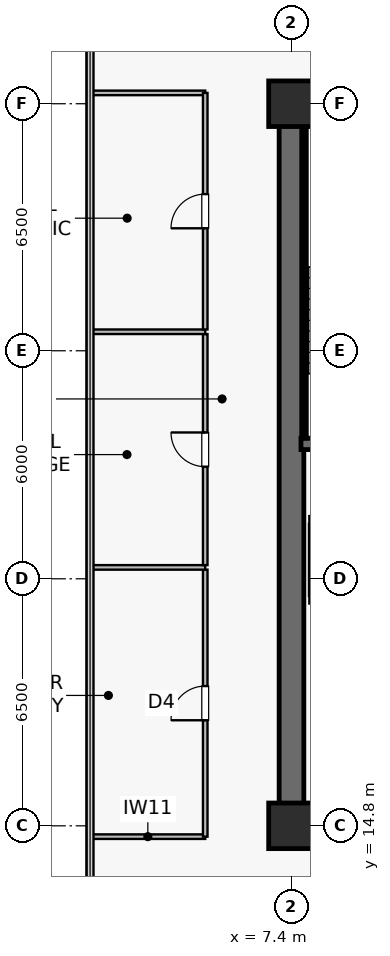
"""IFC4 building model, lengths in metres.
Left out: names, types, materials, properties, quantities, classifications, styles, units other than length and angle.
Written with IfcOpenShell. Run it as: python <this file> out.ifc"""

import sys

from ifc_helpers import new_model, si_unit, direction, frame, frame_2d, origin, origin_2d, place, context, subcontext, project, spatial, rectangle, extrude, source, transform, mapped, element, fill, save


model = new_model("IFC4")
c1 = context("Model", 3, precision=1e-05, world=origin(), true_north=direction((0.0, 1.0)))
c2 = subcontext(c1, "Body", "Model", "MODEL_VIEW")
j1 = project(units=[si_unit("LENGTHUNIT", "METRE"), si_unit("PLANEANGLEUNIT", "RADIAN")], contexts=[c1])
p1 = place(None, origin())
s1 = spatial("IfcSite", under=j1, at=p1, CompositionType="ELEMENT")
p2 = place(p1, origin())
s2 = spatial("IfcBuilding", under=s1, at=p2, CompositionType="ELEMENT")
p3 = place(p2, frame((0.0, 0.0, 162.5)))
s3 = spatial("IfcBuildingStorey", under=s2, at=p3, CompositionType="ELEMENT", Elevation=162.5)
p4 = place(p3, frame((7.075, 14.8, 0.0), z_axis=(0.0, 0.0, 1.0), x_axis=(1.0, 0.0, 0.0)))
e1 = element("IfcWall", 1, at=p4, inside=s3, PredefinedType="SHEAR", context=c2, shape_type="SweptSolid", body=[
    extrude(rectangle(XDim=15.45, YDim=0.65, at=frame_2d((7.725, 0.0))), origin(), (0.0, 0.0, 1.0), 3.79),
])
p5 = place(p3, frame((7.075, 33.8, 0.0), z_axis=(0.0, 0.0, 1.0), x_axis=(1.0, 0.0, 0.0)))
e2 = element("IfcWall", 2, at=p5, inside=s3, PredefinedType="SHEAR", context=c2, shape_type="SweptSolid", body=[
    extrude(rectangle(XDim=15.45, YDim=0.65, at=frame_2d((7.725, 0.0))), origin(), (0.0, 0.0, 1.0), 3.79),
])
p6 = place(p5, frame((6.825, 0.0, 0.0)))
e3 = element("IfcOpeningElement", 3, at=p6, cuts=e2, PredefinedType="OPENING", context=c2, shape_type="SweptSolid", body=[
    extrude(rectangle(XDim=0.95, YDim=2.15, at=frame_2d((0.475, 1.075))), frame((0.0, 0.335, 0.0), z_axis=(0.0, -1.0, 0.0), x_axis=(1.0, 0.0, 0.0)), (0.0, 0.0, 1.0), 0.67),
])
p7 = place(p5, frame((11.89, 0.0, 0.0)))
e4 = element("IfcOpeningElement", 4, at=p7, cuts=e2, PredefinedType="OPENING", context=c2, shape_type="SweptSolid", body=[
    extrude(rectangle(XDim=0.95, YDim=2.15, at=frame_2d((0.475, 1.075))), frame((0.0, 0.335, 0.0), z_axis=(0.0, -1.0, 0.0), x_axis=(1.0, 0.0, 0.0)), (0.0, 0.0, 1.0), 0.67),
])
p8 = place(p3, frame((7.4, 15.125, 0.0), z_axis=(0.0, 0.0, 1.0), x_axis=(0.0, 1.0, 0.0)))
e5 = element("IfcWall", 5, at=p8, inside=s3, PredefinedType="SHEAR", context=c2, shape_type="SweptSolid", body=[
    extrude(rectangle(XDim=18.35, YDim=0.65, at=frame_2d((9.175, 0.0))), origin(), (0.0, 0.0, 1.0), 3.79),
])
p9 = place(p3, frame((7.65, 24.85, 0.0), z_axis=(0.0, 0.0, 1.0), x_axis=(1.0, 0.0, 0.0)))
e6 = element("IfcWall", 6, at=p9, inside=s3, PredefinedType="SHEAR", context=c2, shape_type="SweptSolid", body=[
    extrude(rectangle(XDim=3.8, YDim=0.3, at=frame_2d((1.9, 0.0))), origin(), (0.0, 0.0, 1.0), 3.79),
])
p10 = place(p3, frame((7.73, 33.4, 0.0), z_axis=(0.0, 0.0, 1.0), x_axis=(1.0, 0.0, 0.0)))
e7 = element("IfcWall", 7, at=p10, inside=s3, PredefinedType="SOLIDWALL", context=c2, shape_type="SweptSolid", body=[
    extrude(rectangle(XDim=3.72, YDim=0.12, at=frame_2d((1.86, 0.0))), origin(), (0.0, 0.0, 1.0), 3.79),
])
p11 = place(p3, frame((7.73, 25.0, 0.0), z_axis=(0.0, 0.0, 1.0), x_axis=(0.0, 1.0, 0.0)))
e8 = element("IfcWall", 8, at=p11, inside=s3, PredefinedType="SOLIDWALL", context=c2, shape_type="SweptSolid", body=[
    extrude(rectangle(XDim=8.32, YDim=0.12, at=frame_2d((4.16, 0.0))), origin(), (0.0, 0.0, 1.0), 3.79),
])
m1 = source(origin(), c2, "Body", "SweptSolid", [
    extrude(rectangle(XDim=1.2, YDim=1.2, at=origin_2d()), origin(), (0.0, 0.0, 1.0), 4.1),
])
for number, where, z_axis, x_axis in (
    (9, (7.4, 14.8, 0.0), (0.0, 0.0, 1.0), (1.0, 0.0, 0.0)),
    (10, (7.4, 33.8, 0.0), (0.0, 0.0, 1.0), (1.0, 0.0, 0.0)),
):
    element("IfcColumn", number, at=place(p3, frame(where, z_axis=z_axis, x_axis=x_axis)), inside=s3, PredefinedType="COLUMN", context=c2, shape_type="MappedRepresentation", body=[
        mapped(m1, transform((0.0, 0.0, 0.0), scale=1.0)),
    ])
for number, where, z_axis, x_axis in (
    (11, (7.87, 20.75, 0.0), (0.0, 0.0, 1.0), (1.0, 0.0, 0.0)),
    (12, (7.87, 22.85, 0.0), (0.0, 0.0, 1.0), (1.0, 0.0, 0.0)),
):
    element("IfcWall", number, at=place(p3, frame(where, z_axis=z_axis, x_axis=x_axis)), inside=s3, PredefinedType="SOLIDWALL", context=c2, shape_type="SweptSolid", body=[
        extrude(rectangle(XDim=2.26, YDim=0.2, at=frame_2d((1.13, 0.0))), origin(), (0.0, 0.0, 1.0), 3.79),
    ])
p12 = place(p3, frame((7.95, 20.85, 0.0), z_axis=(0.0, 0.0, 1.0), x_axis=(0.0, 1.0, 0.0)))
e13 = element("IfcWall", 13, at=p12, inside=s3, PredefinedType="SOLIDWALL", context=c2, shape_type="SweptSolid", body=[
    extrude(rectangle(XDim=1.9, YDim=0.18, at=frame_2d((0.95, 0.0))), origin(), (0.0, 0.0, 1.0), 3.79),
])
for number, where, z_axis, x_axis in (
    (14, (2.11, 14.515, 0.0), (0.0, 0.0, 1.0), (1.0, 0.0, 0.0)),
    (15, (2.11, 34.085, 0.0), (0.0, 0.0, 1.0), (1.0, 0.0, 0.0)),
):
    element("IfcWall", number, at=place(p3, frame(where, z_axis=z_axis, x_axis=x_axis)), inside=s3, PredefinedType="PARTITIONING", context=c2, shape_type="SweptSolid", body=[
        extrude(rectangle(XDim=3.02, YDim=0.12, at=frame_2d((1.51, 0.0))), origin(), (0.0, 0.0, 1.0), 3.79),
    ])
p13 = place(p3, frame((5.13, 14.515, 0.0), z_axis=(0.0, 0.0, 1.0), x_axis=(0.0, 1.0, 0.0)))
e16 = element("IfcWall", 16, at=p13, inside=s3, PredefinedType="PARTITIONING", context=c2, shape_type="SweptSolid", body=[
    extrude(rectangle(XDim=7.025, YDim=0.12, at=frame_2d((3.513, 0.0))), origin(), (0.0, 0.0, 1.0), 3.79),
])
p14 = place(p13, frame((3.062, 0.0, 0.0)))
e17 = element("IfcOpeningElement", 17, at=p14, cuts=e16, PredefinedType="OPENING", context=c2, shape_type="SweptSolid", body=[
    extrude(rectangle(XDim=0.9, YDim=2.1, at=frame_2d((0.45, 1.05))), frame((0.0, 0.07, 0.0), z_axis=(0.0, -1.0, 0.0), x_axis=(1.0, 0.0, 0.0)), (0.0, 0.0, 1.0), 0.14),
])
p15 = place(p3, frame((2.11, 21.6, 0.0), z_axis=(0.0, 0.0, 1.0), x_axis=(1.0, 0.0, 0.0)))
e18 = element("IfcWall", 18, at=p15, inside=s3, PredefinedType="PARTITIONING", context=c2, shape_type="SweptSolid", body=[
    extrude(rectangle(XDim=3.02, YDim=0.12, at=frame_2d((1.51, 0.0))), origin(), (0.0, 0.0, 1.0), 3.79),
])
p16 = place(p3, frame((5.13, 21.66, 0.0), z_axis=(0.0, 0.0, 1.0), x_axis=(0.0, 1.0, 0.0)))
e19 = element("IfcWall", 19, at=p16, inside=s3, PredefinedType="PARTITIONING", context=c2, shape_type="SweptSolid", body=[
    extrude(rectangle(XDim=6.08, YDim=0.12, at=frame_2d((3.04, 0.0))), origin(), (0.0, 0.0, 1.0), 3.79),
])
p17 = place(p16, frame((2.59, 0.0, 0.0)))
e20 = element("IfcOpeningElement", 20, at=p17, cuts=e19, PredefinedType="OPENING", context=c2, shape_type="SweptSolid", body=[
    extrude(rectangle(XDim=0.9, YDim=2.1, at=frame_2d((0.45, 1.05))), frame((0.0, 0.07, 0.0), z_axis=(0.0, -1.0, 0.0), x_axis=(1.0, 0.0, 0.0)), (0.0, 0.0, 1.0), 0.14),
])
p18 = place(p3, frame((2.11, 27.8, 0.0), z_axis=(0.0, 0.0, 1.0), x_axis=(1.0, 0.0, 0.0)))
e21 = element("IfcWall", 21, at=p18, inside=s3, PredefinedType="PARTITIONING", context=c2, shape_type="SweptSolid", body=[
    extrude(rectangle(XDim=3.02, YDim=0.12, at=frame_2d((1.51, 0.0))), origin(), (0.0, 0.0, 1.0), 3.79),
])
p19 = place(p3, frame((5.13, 27.86, 0.0), z_axis=(0.0, 0.0, 1.0), x_axis=(0.0, 1.0, 0.0)))
e22 = element("IfcWall", 22, at=p19, inside=s3, PredefinedType="PARTITIONING", context=c2, shape_type="SweptSolid", body=[
    extrude(rectangle(XDim=6.225, YDim=0.12, at=frame_2d((3.112, 0.0))), origin(), (0.0, 0.0, 1.0), 3.79),
])
p20 = place(p19, frame((2.663, 0.0, 0.0)))
e23 = element("IfcOpeningElement", 23, at=p20, cuts=e22, PredefinedType="OPENING", context=c2, shape_type="SweptSolid", body=[
    extrude(rectangle(XDim=0.9, YDim=2.1, at=frame_2d((0.45, 1.05))), frame((0.0, 0.07, 0.0), z_axis=(0.0, -1.0, 0.0), x_axis=(1.0, 0.0, 0.0)), (0.0, 0.0, 1.0), 0.14),
])
m2 = source(origin(), c2, "Body", "SweptSolid", [
    extrude(rectangle(XDim=0.9, YDim=2.1, at=frame_2d((0.45, 1.05))), frame((0.0, 0.025, 0.0), z_axis=(0.0, -1.0, 0.0), x_axis=(1.0, 0.0, 0.0)), (0.0, 0.0, 1.0), 0.05),
])
p21 = place(p14, origin())
e24 = element("IfcDoor", 24, at=p21, inside=s3, OperationType="SINGLE_SWING_LEFT", PredefinedType="DOOR", context=c2, shape_type="MappedRepresentation", body=[
    mapped(m2, transform((0.0, 0.0, 0.0), scale=1.0)),
])
fill(e17, e24)
p22 = place(p17, origin())
e25 = element("IfcDoor", 25, at=p22, inside=s3, OperationType="SINGLE_SWING_RIGHT", PredefinedType="DOOR", context=c2, shape_type="MappedRepresentation", body=[
    mapped(m2, transform((0.0, 0.0, 0.0), scale=1.0)),
])
fill(e20, e25)
p23 = place(p20, origin())
e26 = element("IfcDoor", 26, at=p23, inside=s3, OperationType="SINGLE_SWING_LEFT", PredefinedType="DOOR", context=c2, shape_type="MappedRepresentation", body=[
    mapped(m2, transform((0.0, 0.0, 0.0), scale=1.0)),
])
fill(e23, e26)
save(model, sys.argv[1])
